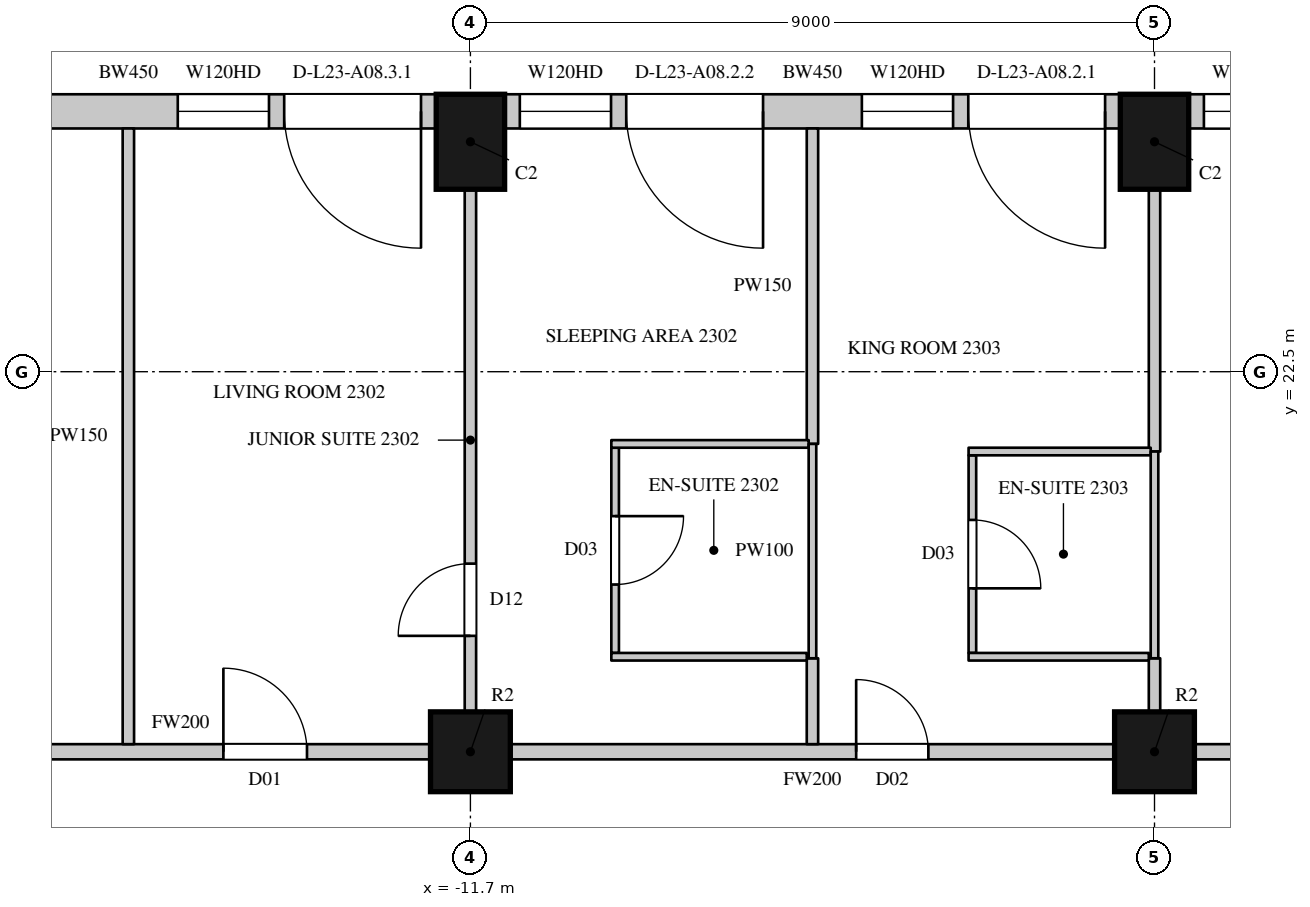
"""IFC4 building model, lengths in metres.
Left out: names, types, materials, properties, quantities, classifications, styles, units other than length and angle.
Written with IfcOpenShell. Run it as: python <this file> out.ifc"""

import sys

from ifc_helpers import new_model, si_unit, direction, frame, frame_2d, origin, origin_2d, place, context, subcontext, project, spatial, rectangle, circle, extrude, element, fill, save


model = new_model("IFC4")
c1 = context("Model", 3, precision=1e-05, world=origin(), true_north=direction((0.0, 1.0)))
c2 = subcontext(c1, "Body", "Model", "MODEL_VIEW")
j1 = project(units=[si_unit("LENGTHUNIT", "METRE"), si_unit("PLANEANGLEUNIT", "RADIAN")], contexts=[c1])
p1 = place(None, origin())
s1 = spatial("IfcSite", under=j1, at=p1, CompositionType="ELEMENT")
p2 = place(p1, origin())
s2 = spatial("IfcBuilding", under=s1, at=p2, CompositionType="ELEMENT")
p3 = place(p2, frame((0.0, 0.0, 113.1)))
s3 = spatial("IfcBuildingStorey", under=s2, at=p3, CompositionType="ELEMENT", Elevation=113.1)
for number, where, z_axis, x_axis in (
    (1, (-2.7, 25.525, 0.0), (0.0, 0.0, 1.0), (-1.0, 0.0, 0.0)),
    (2, (-11.7, 25.525, 0.0), (0.0, 0.0, 1.0), (-1.0, 0.0, 0.0)),
):
    element("IfcColumn", number, at=place(p3, frame(where, z_axis=z_axis, x_axis=x_axis)), inside=s3, PredefinedType="COLUMN", context=c2, shape_type="SweptSolid", body=[
        extrude(rectangle(XDim=0.9, YDim=1.25, at=origin_2d()), origin(), (0.0, 0.0, 1.0), 3.6),
    ])
for number, where, z_axis, x_axis in (
    (3, (-11.7, 17.5, 0.0), (0.0, 0.0, 1.0), (1.0, 0.0, 0.0)),
    (4, (-2.7, 17.5, 0.0), (0.0, 0.0, 1.0), (1.0, 0.0, 0.0)),
):
    element("IfcColumn", number, at=place(p3, frame(where, z_axis=z_axis, x_axis=x_axis)), inside=s3, PredefinedType="COLUMN", context=c2, shape_type="SweptSolid", body=[
        extrude(circle(Radius=0.525, at=origin_2d()), origin(), (0.0, 0.0, 1.0), 3.6),
    ])
p4 = place(p3, frame((5.85, 25.925, 0.0), z_axis=(0.0, 0.0, 1.0), x_axis=(-1.0, 0.0, 0.0)))
e5 = element("IfcWall", 5, at=p4, inside=s3, PredefinedType="SOLIDWALL", context=c2, shape_type="SweptSolid", body=[
    extrude(rectangle(XDim=8.1, YDim=0.45, at=frame_2d((4.05, 0.0))), origin(), (0.0, 0.0, 1.0), 3.3),
])
p5 = place(p4, frame((0.2, 0.0, 0.0)))
e6 = element("IfcOpeningElement", 6, at=p5, cuts=e5, PredefinedType="OPENING", context=c2, shape_type="SweptSolid", body=[
    extrude(rectangle(XDim=1.8, YDim=2.4, at=frame_2d((0.9, 1.2))), frame((0.0, 0.235, 0.0), z_axis=(0.0, -1.0, 0.0), x_axis=(1.0, 0.0, 0.0)), (0.0, 0.0, 1.0), 0.47),
])
p6 = place(p4, frame((2.2, 0.0, 1.05)))
e7 = element("IfcOpeningElement", 7, at=p6, cuts=e5, PredefinedType="OPENING", context=c2, shape_type="SweptSolid", body=[
    extrude(rectangle(XDim=1.2, YDim=2.0, at=frame_2d((0.6, 1.0))), frame((0.0, 0.235, 0.0), z_axis=(0.0, -1.0, 0.0), x_axis=(1.0, 0.0, 0.0)), (0.0, 0.0, 1.0), 0.47),
])
p7 = place(p4, frame((4.7, 0.0, 0.0)))
e8 = element("IfcOpeningElement", 8, at=p7, cuts=e5, PredefinedType="OPENING", context=c2, shape_type="SweptSolid", body=[
    extrude(rectangle(XDim=1.8, YDim=2.4, at=frame_2d((0.9, 1.2))), frame((0.0, 0.235, 0.0), z_axis=(0.0, -1.0, 0.0), x_axis=(1.0, 0.0, 0.0)), (0.0, 0.0, 1.0), 0.47),
])
p8 = place(p4, frame((6.7, 0.0, 1.05)))
e9 = element("IfcOpeningElement", 9, at=p8, cuts=e5, PredefinedType="OPENING", context=c2, shape_type="SweptSolid", body=[
    extrude(rectangle(XDim=1.2, YDim=2.0, at=frame_2d((0.6, 1.0))), frame((0.0, 0.235, 0.0), z_axis=(0.0, -1.0, 0.0), x_axis=(1.0, 0.0, 0.0)), (0.0, 0.0, 1.0), 0.47),
])
p9 = place(p3, frame((-3.15, 25.925, 0.0), z_axis=(0.0, 0.0, 1.0), x_axis=(-1.0, 0.0, 0.0)))
e10 = element("IfcWall", 10, at=p9, inside=s3, PredefinedType="SOLIDWALL", context=c2, shape_type="SweptSolid", body=[
    extrude(rectangle(XDim=8.1, YDim=0.45, at=frame_2d((4.05, 0.0))), origin(), (0.0, 0.0, 1.0), 3.3),
])
p10 = place(p9, frame((0.2, 0.0, 0.0)))
e11 = element("IfcOpeningElement", 11, at=p10, cuts=e10, PredefinedType="OPENING", context=c2, shape_type="SweptSolid", body=[
    extrude(rectangle(XDim=1.8, YDim=2.4, at=frame_2d((0.9, 1.2))), frame((0.0, 0.235, 0.0), z_axis=(0.0, -1.0, 0.0), x_axis=(1.0, 0.0, 0.0)), (0.0, 0.0, 1.0), 0.47),
])
p11 = place(p9, frame((2.2, 0.0, 1.05)))
e12 = element("IfcOpeningElement", 12, at=p11, cuts=e10, PredefinedType="OPENING", context=c2, shape_type="SweptSolid", body=[
    extrude(rectangle(XDim=1.2, YDim=2.0, at=frame_2d((0.6, 1.0))), frame((0.0, 0.235, 0.0), z_axis=(0.0, -1.0, 0.0), x_axis=(1.0, 0.0, 0.0)), (0.0, 0.0, 1.0), 0.47),
])
p12 = place(p9, frame((4.7, 0.0, 0.0)))
e13 = element("IfcOpeningElement", 13, at=p12, cuts=e10, PredefinedType="OPENING", context=c2, shape_type="SweptSolid", body=[
    extrude(rectangle(XDim=1.8, YDim=2.4, at=frame_2d((0.9, 1.2))), frame((0.0, 0.235, 0.0), z_axis=(0.0, -1.0, 0.0), x_axis=(1.0, 0.0, 0.0)), (0.0, 0.0, 1.0), 0.47),
])
p13 = place(p9, frame((6.7, 0.0, 1.05)))
e14 = element("IfcOpeningElement", 14, at=p13, cuts=e10, PredefinedType="OPENING", context=c2, shape_type="SweptSolid", body=[
    extrude(rectangle(XDim=1.2, YDim=2.0, at=frame_2d((0.6, 1.0))), frame((0.0, 0.235, 0.0), z_axis=(0.0, -1.0, 0.0), x_axis=(1.0, 0.0, 0.0)), (0.0, 0.0, 1.0), 0.47),
])
p14 = place(p3, frame((-12.15, 25.925, 0.0), z_axis=(0.0, 0.0, 1.0), x_axis=(-1.0, 0.0, 0.0)))
e15 = element("IfcWall", 15, at=p14, inside=s3, PredefinedType="SOLIDWALL", context=c2, shape_type="SweptSolid", body=[
    extrude(rectangle(XDim=8.1, YDim=0.45, at=frame_2d((4.05, 0.0))), origin(), (0.0, 0.0, 1.0), 3.3),
])
p15 = place(p14, frame((0.2, 0.0, 0.0)))
e16 = element("IfcOpeningElement", 16, at=p15, cuts=e15, PredefinedType="OPENING", context=c2, shape_type="SweptSolid", body=[
    extrude(rectangle(XDim=1.8, YDim=2.4, at=frame_2d((0.9, 1.2))), frame((0.0, 0.235, 0.0), z_axis=(0.0, -1.0, 0.0), x_axis=(1.0, 0.0, 0.0)), (0.0, 0.0, 1.0), 0.47),
])
p16 = place(p14, frame((2.2, 0.0, 1.05)))
e17 = element("IfcOpeningElement", 17, at=p16, cuts=e15, PredefinedType="OPENING", context=c2, shape_type="SweptSolid", body=[
    extrude(rectangle(XDim=1.2, YDim=2.0, at=frame_2d((0.6, 1.0))), frame((0.0, 0.235, 0.0), z_axis=(0.0, -1.0, 0.0), x_axis=(1.0, 0.0, 0.0)), (0.0, 0.0, 1.0), 0.47),
])
p17 = place(p14, frame((5.4, 0.0, 0.0)))
e18 = element("IfcOpeningElement", 18, at=p17, cuts=e15, PredefinedType="OPENING", context=c2, shape_type="SweptSolid", body=[
    extrude(rectangle(XDim=1.8, YDim=2.4, at=frame_2d((0.9, 1.2))), frame((0.0, 0.235, 0.0), z_axis=(0.0, -1.0, 0.0), x_axis=(1.0, 0.0, 0.0)), (0.0, 0.0, 1.0), 0.47),
])
p18 = place(p3, frame((-18.8, 17.5, 0.0), z_axis=(0.0, 0.0, 1.0), x_axis=(1.0, 0.0, 0.0)))
e19 = element("IfcWall", 19, at=p18, inside=s3, PredefinedType="PARTITIONING", context=c2, shape_type="SweptSolid", body=[
    extrude(rectangle(XDim=6.575, YDim=0.2, at=frame_2d((3.288, 0.0))), origin(), (0.0, 0.0, 1.0), 2.75),
])
p19 = place(p18, frame((3.85, 0.0, 0.0)))
e20 = element("IfcOpeningElement", 20, at=p19, cuts=e19, PredefinedType="OPENING", context=c2, shape_type="SweptSolid", body=[
    extrude(rectangle(XDim=1.1, YDim=2.4, at=frame_2d((0.55, 1.2))), frame((0.0, 0.11, 0.0), z_axis=(0.0, -1.0, 0.0), x_axis=(1.0, 0.0, 0.0)), (0.0, 0.0, 1.0), 0.22),
])
p20 = place(p3, frame((-11.175, 17.5, 0.0), z_axis=(0.0, 0.0, 1.0), x_axis=(1.0, 0.0, 0.0)))
e21 = element("IfcWall", 21, at=p20, inside=s3, PredefinedType="PARTITIONING", context=c2, shape_type="SweptSolid", body=[
    extrude(rectangle(XDim=7.95, YDim=0.2, at=frame_2d((3.975, 0.0))), origin(), (0.0, 0.0, 1.0), 2.75),
])
p21 = place(p20, frame((4.55, 0.0, 0.0)))
e22 = element("IfcOpeningElement", 22, at=p21, cuts=e21, PredefinedType="OPENING", context=c2, shape_type="SweptSolid", body=[
    extrude(rectangle(XDim=0.95, YDim=2.2, at=frame_2d((0.475, 1.1))), frame((0.0, 0.11, 0.0), z_axis=(0.0, -1.0, 0.0), x_axis=(1.0, 0.0, 0.0)), (0.0, 0.0, 1.0), 0.22),
])
p22 = place(p3, frame((-2.175, 17.5, 0.0), z_axis=(0.0, 0.0, 1.0), x_axis=(1.0, 0.0, 0.0)))
e23 = element("IfcWall", 23, at=p22, inside=s3, PredefinedType="PARTITIONING", context=c2, shape_type="SweptSolid", body=[
    extrude(rectangle(XDim=7.95, YDim=0.2, at=frame_2d((3.975, 0.0))), origin(), (0.0, 0.0, 1.0), 2.75),
])
p23 = place(p22, frame((1.65, 0.0, 0.0)))
e24 = element("IfcOpeningElement", 24, at=p23, cuts=e23, PredefinedType="OPENING", context=c2, shape_type="SweptSolid", body=[
    extrude(rectangle(XDim=1.1, YDim=2.4, at=frame_2d((0.55, 1.2))), frame((0.0, 0.11, 0.0), z_axis=(0.0, -1.0, 0.0), x_axis=(1.0, 0.0, 0.0)), (0.0, 0.0, 1.0), 0.22),
])
p24 = place(p3, frame((-16.2, 17.6, 0.0), z_axis=(0.0, 0.0, 1.0), x_axis=(0.0, 1.0, 0.0)))
e25 = element("IfcWall", 25, at=p24, inside=s3, PredefinedType="PARTITIONING", context=c2, shape_type="SweptSolid", body=[
    extrude(rectangle(XDim=8.1, YDim=0.15, at=frame_2d((4.05, 0.0))), origin(), (0.0, 0.0, 1.0), 2.65),
])
p25 = place(p3, frame((-11.7, 18.025, 0.0), z_axis=(0.0, 0.0, 1.0), x_axis=(0.0, 1.0, 0.0)))
e26 = element("IfcWall", 26, at=p25, inside=s3, PredefinedType="PARTITIONING", context=c2, shape_type="SweptSolid", body=[
    extrude(rectangle(XDim=6.875, YDim=0.15, at=frame_2d((3.438, 0.0))), origin(), (0.0, 0.0, 1.0), 2.75),
])
p26 = place(p25, frame((1.0, 0.0, 0.0)))
e27 = element("IfcOpeningElement", 27, at=p26, cuts=e26, PredefinedType="OPENING", context=c2, shape_type="SweptSolid", body=[
    extrude(rectangle(XDim=0.95, YDim=2.2, at=frame_2d((0.475, 1.1))), frame((0.0, 0.085, 0.0), z_axis=(0.0, -1.0, 0.0), x_axis=(1.0, 0.0, 0.0)), (0.0, 0.0, 1.0), 0.17),
])
p27 = place(p3, frame((-7.2, 17.6, 0.0), z_axis=(0.0, 0.0, 1.0), x_axis=(0.0, 1.0, 0.0)))
e28 = element("IfcWall", 28, at=p27, inside=s3, PredefinedType="PARTITIONING", context=c2, shape_type="SweptSolid", body=[
    extrude(rectangle(XDim=1.13, YDim=0.15, at=frame_2d((0.565, 0.0))), origin(), (0.0, 0.0, 1.0), 2.65),
])
p28 = place(p3, frame((-7.2, 21.55, 0.0), z_axis=(0.0, 0.0, 1.0), x_axis=(0.0, 1.0, 0.0)))
e29 = element("IfcWall", 29, at=p28, inside=s3, PredefinedType="PARTITIONING", context=c2, shape_type="SweptSolid", body=[
    extrude(rectangle(XDim=4.15, YDim=0.15, at=frame_2d((2.075, 0.0))), origin(), (0.0, 0.0, 1.0), 2.65),
])
p29 = place(p3, frame((-2.7, 18.025, 0.0), z_axis=(0.0, 0.0, 1.0), x_axis=(0.0, 1.0, 0.0)))
e30 = element("IfcWall", 30, at=p29, inside=s3, PredefinedType="PARTITIONING", context=c2, shape_type="SweptSolid", body=[
    extrude(rectangle(XDim=0.705, YDim=0.15, at=frame_2d((0.353, 0.0))), origin(), (0.0, 0.0, 1.0), 2.75),
])
p30 = place(p3, frame((-2.7, 21.45, 0.0), z_axis=(0.0, 0.0, 1.0), x_axis=(0.0, 1.0, 0.0)))
e31 = element("IfcWall", 31, at=p30, inside=s3, PredefinedType="PARTITIONING", context=c2, shape_type="SweptSolid", body=[
    extrude(rectangle(XDim=3.45, YDim=0.15, at=frame_2d((1.725, 0.0))), origin(), (0.0, 0.0, 1.0), 2.75),
])
p31 = place(p3, frame((-9.796, 18.8, 0.0), z_axis=(0.0, 0.0, 1.0), x_axis=(0.0, 1.0, 0.0)))
e32 = element("IfcWall", 32, at=p31, inside=s3, PredefinedType="PARTITIONING", context=c2, shape_type="SweptSolid", body=[
    extrude(rectangle(XDim=2.7, YDim=0.1, at=frame_2d((1.35, 0.0))), origin(), (0.0, 0.0, 1.0), 3.3),
])
p32 = place(p31, frame((0.9, 0.0, 0.0)))
e33 = element("IfcOpeningElement", 33, at=p32, cuts=e32, PredefinedType="OPENING", context=c2, shape_type="SweptSolid", body=[
    extrude(rectangle(XDim=0.9, YDim=2.2, at=frame_2d((0.45, 1.1))), frame((0.0, 0.06, 0.0), z_axis=(0.0, -1.0, 0.0), x_axis=(1.0, 0.0, 0.0)), (0.0, 0.0, 1.0), 0.12),
])
p33 = place(p3, frame((-9.846, 18.75, 0.0), z_axis=(0.0, 0.0, 1.0), x_axis=(1.0, 0.0, 0.0)))
e34 = element("IfcWall", 34, at=p33, inside=s3, PredefinedType="PARTITIONING", context=c2, shape_type="SweptSolid", body=[
    extrude(rectangle(XDim=2.571, YDim=0.1, at=frame_2d((1.286, 0.0))), origin(), (0.0, 0.0, 1.0), 3.3),
])
p34 = place(p3, frame((-9.846, 21.55, 0.0), z_axis=(0.0, 0.0, 1.0), x_axis=(1.0, 0.0, 0.0)))
e35 = element("IfcWall", 35, at=p34, inside=s3, PredefinedType="PARTITIONING", context=c2, shape_type="SweptSolid", body=[
    extrude(rectangle(XDim=2.596, YDim=0.1, at=frame_2d((1.298, 0.0))), origin(), (0.0, 0.0, 1.0), 3.3),
])
p35 = place(p3, frame((-7.2, 18.73, 0.0), z_axis=(0.0, 0.0, 1.0), x_axis=(0.0, 1.0, 0.0)))
e36 = element("IfcWall", 36, at=p35, inside=s3, PredefinedType="PARTITIONING", context=c2, shape_type="SweptSolid", body=[
    extrude(rectangle(XDim=2.82, YDim=0.1, at=frame_2d((1.41, 0.0))), origin(), (0.0, 0.0, 1.0), 2.65),
])
p36 = place(p3, frame((-5.096, 18.8, 0.0), z_axis=(0.0, 0.0, 1.0), x_axis=(0.0, 1.0, 0.0)))
e37 = element("IfcWall", 37, at=p36, inside=s3, PredefinedType="PARTITIONING", context=c2, shape_type="SweptSolid", body=[
    extrude(rectangle(XDim=2.6, YDim=0.1, at=frame_2d((1.3, 0.0))), origin(), (0.0, 0.0, 1.0), 3.3),
])
p37 = place(p36, frame((0.85, 0.0, 0.0)))
e38 = element("IfcOpeningElement", 38, at=p37, cuts=e37, PredefinedType="OPENING", context=c2, shape_type="SweptSolid", body=[
    extrude(rectangle(XDim=0.9, YDim=2.2, at=frame_2d((0.45, 1.1))), frame((0.0, 0.06, 0.0), z_axis=(0.0, -1.0, 0.0), x_axis=(1.0, 0.0, 0.0)), (0.0, 0.0, 1.0), 0.12),
])
p38 = place(p3, frame((-5.146, 18.75, 0.0), z_axis=(0.0, 0.0, 1.0), x_axis=(1.0, 0.0, 0.0)))
e39 = element("IfcWall", 39, at=p38, inside=s3, PredefinedType="PARTITIONING", context=c2, shape_type="SweptSolid", body=[
    extrude(rectangle(XDim=2.371, YDim=0.1, at=frame_2d((1.186, 0.0))), origin(), (0.0, 0.0, 1.0), 3.3),
])
p39 = place(p3, frame((-5.146, 21.45, 0.0), z_axis=(0.0, 0.0, 1.0), x_axis=(1.0, 0.0, 0.0)))
e40 = element("IfcWall", 40, at=p39, inside=s3, PredefinedType="PARTITIONING", context=c2, shape_type="SweptSolid", body=[
    extrude(rectangle(XDim=2.396, YDim=0.1, at=frame_2d((1.198, 0.0))), origin(), (0.0, 0.0, 1.0), 3.3),
])
p40 = place(p3, frame((-2.7, 18.73, 0.0), z_axis=(0.0, 0.0, 1.0), x_axis=(0.0, 1.0, 0.0)))
e41 = element("IfcWall", 41, at=p40, inside=s3, PredefinedType="PARTITIONING", context=c2, shape_type="SweptSolid", body=[
    extrude(rectangle(XDim=2.72, YDim=0.1, at=frame_2d((1.36, 0.0))), origin(), (0.0, 0.0, 1.0), 2.75),
])
p41 = place(p8, origin())
e42 = element("IfcWindow", 42, at=p41, inside=s3, PartitioningType="SINGLE_PANEL", PredefinedType="WINDOW", context=c2, shape_type="SweptSolid", body=[
    extrude(rectangle(XDim=1.2, YDim=2.0, at=frame_2d((0.6, 1.0))), frame((0.0, 0.135, 0.0), z_axis=(0.0, -1.0, 0.0), x_axis=(1.0, 0.0, 0.0)), (0.0, 0.0, 1.0), 0.06),
])
fill(e9, e42)
p42 = place(p10, origin())
e43 = element("IfcDoor", 43, at=p42, inside=s3, OperationType="SLIDING_TO_LEFT", PredefinedType="DOOR", context=c2, shape_type="SweptSolid", body=[
    extrude(rectangle(XDim=1.8, YDim=2.4, at=frame_2d((0.9, 1.2))), frame((0.0, 0.13, 0.0), z_axis=(0.0, -1.0, 0.0), x_axis=(1.0, 0.0, 0.0)), (0.0, 0.0, 1.0), 0.05),
])
fill(e11, e43)
p43 = place(p11, origin())
e44 = element("IfcWindow", 44, at=p43, inside=s3, PartitioningType="SINGLE_PANEL", PredefinedType="WINDOW", context=c2, shape_type="SweptSolid", body=[
    extrude(rectangle(XDim=1.2, YDim=2.0, at=frame_2d((0.6, 1.0))), frame((0.0, 0.135, 0.0), z_axis=(0.0, -1.0, 0.0), x_axis=(1.0, 0.0, 0.0)), (0.0, 0.0, 1.0), 0.06),
])
fill(e12, e44)
p44 = place(p12, origin())
e45 = element("IfcDoor", 45, at=p44, inside=s3, OperationType="SLIDING_TO_LEFT", PredefinedType="DOOR", context=c2, shape_type="SweptSolid", body=[
    extrude(rectangle(XDim=1.8, YDim=2.4, at=frame_2d((0.9, 1.2))), frame((0.0, 0.13, 0.0), z_axis=(0.0, -1.0, 0.0), x_axis=(1.0, 0.0, 0.0)), (0.0, 0.0, 1.0), 0.05),
])
fill(e13, e45)
p45 = place(p13, origin())
e46 = element("IfcWindow", 46, at=p45, inside=s3, PartitioningType="SINGLE_PANEL", PredefinedType="WINDOW", context=c2, shape_type="SweptSolid", body=[
    extrude(rectangle(XDim=1.2, YDim=2.0, at=frame_2d((0.6, 1.0))), frame((0.0, 0.135, 0.0), z_axis=(0.0, -1.0, 0.0), x_axis=(1.0, 0.0, 0.0)), (0.0, 0.0, 1.0), 0.06),
])
fill(e14, e46)
p46 = place(p15, origin())
e47 = element("IfcDoor", 47, at=p46, inside=s3, OperationType="SLIDING_TO_LEFT", PredefinedType="DOOR", context=c2, shape_type="SweptSolid", body=[
    extrude(rectangle(XDim=1.8, YDim=2.4, at=frame_2d((0.9, 1.2))), frame((0.0, 0.13, 0.0), z_axis=(0.0, -1.0, 0.0), x_axis=(1.0, 0.0, 0.0)), (0.0, 0.0, 1.0), 0.05),
])
fill(e16, e47)
p47 = place(p16, origin())
e48 = element("IfcWindow", 48, at=p47, inside=s3, PartitioningType="SINGLE_PANEL", PredefinedType="WINDOW", context=c2, shape_type="SweptSolid", body=[
    extrude(rectangle(XDim=1.2, YDim=2.0, at=frame_2d((0.6, 1.0))), frame((0.0, 0.135, 0.0), z_axis=(0.0, -1.0, 0.0), x_axis=(1.0, 0.0, 0.0)), (0.0, 0.0, 1.0), 0.06),
])
fill(e17, e48)
p48 = place(p19, origin())
e49 = element("IfcDoor", 49, at=p48, inside=s3, OperationType="SINGLE_SWING_LEFT", PredefinedType="DOOR", context=c2, shape_type="SweptSolid", body=[
    extrude(rectangle(XDim=1.1, YDim=2.4, at=frame_2d((0.55, 1.2))), frame((0.0, 0.025, 0.0), z_axis=(0.0, -1.0, 0.0), x_axis=(1.0, 0.0, 0.0)), (0.0, 0.0, 1.0), 0.05),
])
fill(e20, e49)
p49 = place(p26, origin())
e50 = element("IfcDoor", 50, at=p49, inside=s3, OperationType="SINGLE_SWING_LEFT", PredefinedType="DOOR", context=c2, shape_type="SweptSolid", body=[
    extrude(rectangle(XDim=0.95, YDim=2.2, at=frame_2d((0.475, 1.1))), frame((0.0, 0.025, 0.0), z_axis=(0.0, -1.0, 0.0), x_axis=(1.0, 0.0, 0.0)), (0.0, 0.0, 1.0), 0.05),
])
fill(e27, e50)
p50 = place(p32, origin())
e51 = element("IfcDoor", 51, at=p50, inside=s3, OperationType="SINGLE_SWING_LEFT", PredefinedType="DOOR", context=c2, shape_type="SweptSolid", body=[
    extrude(rectangle(XDim=0.9, YDim=2.2, at=frame_2d((0.45, 1.1))), frame((0.0, 0.025, 0.0), z_axis=(0.0, -1.0, 0.0), x_axis=(1.0, 0.0, 0.0)), (0.0, 0.0, 1.0), 0.05),
])
fill(e33, e51)
p51 = place(p21, origin())
e52 = element("IfcDoor", 52, at=p51, inside=s3, OperationType="SINGLE_SWING_LEFT", PredefinedType="DOOR", context=c2, shape_type="SweptSolid", body=[
    extrude(rectangle(XDim=0.95, YDim=2.2, at=frame_2d((0.475, 1.1))), frame((0.0, 0.025, 0.0), z_axis=(0.0, -1.0, 0.0), x_axis=(1.0, 0.0, 0.0)), (0.0, 0.0, 1.0), 0.05),
])
fill(e22, e52)
p52 = place(p37, origin())
e53 = element("IfcDoor", 53, at=p52, inside=s3, OperationType="SINGLE_SWING_RIGHT", PredefinedType="DOOR", context=c2, shape_type="SweptSolid", body=[
    extrude(rectangle(XDim=0.9, YDim=2.2, at=frame_2d((0.45, 1.1))), frame((0.0, 0.025, 0.0), z_axis=(0.0, -1.0, 0.0), x_axis=(1.0, 0.0, 0.0)), (0.0, 0.0, 1.0), 0.05),
])
fill(e38, e53)
save(model, sys.argv[1])
